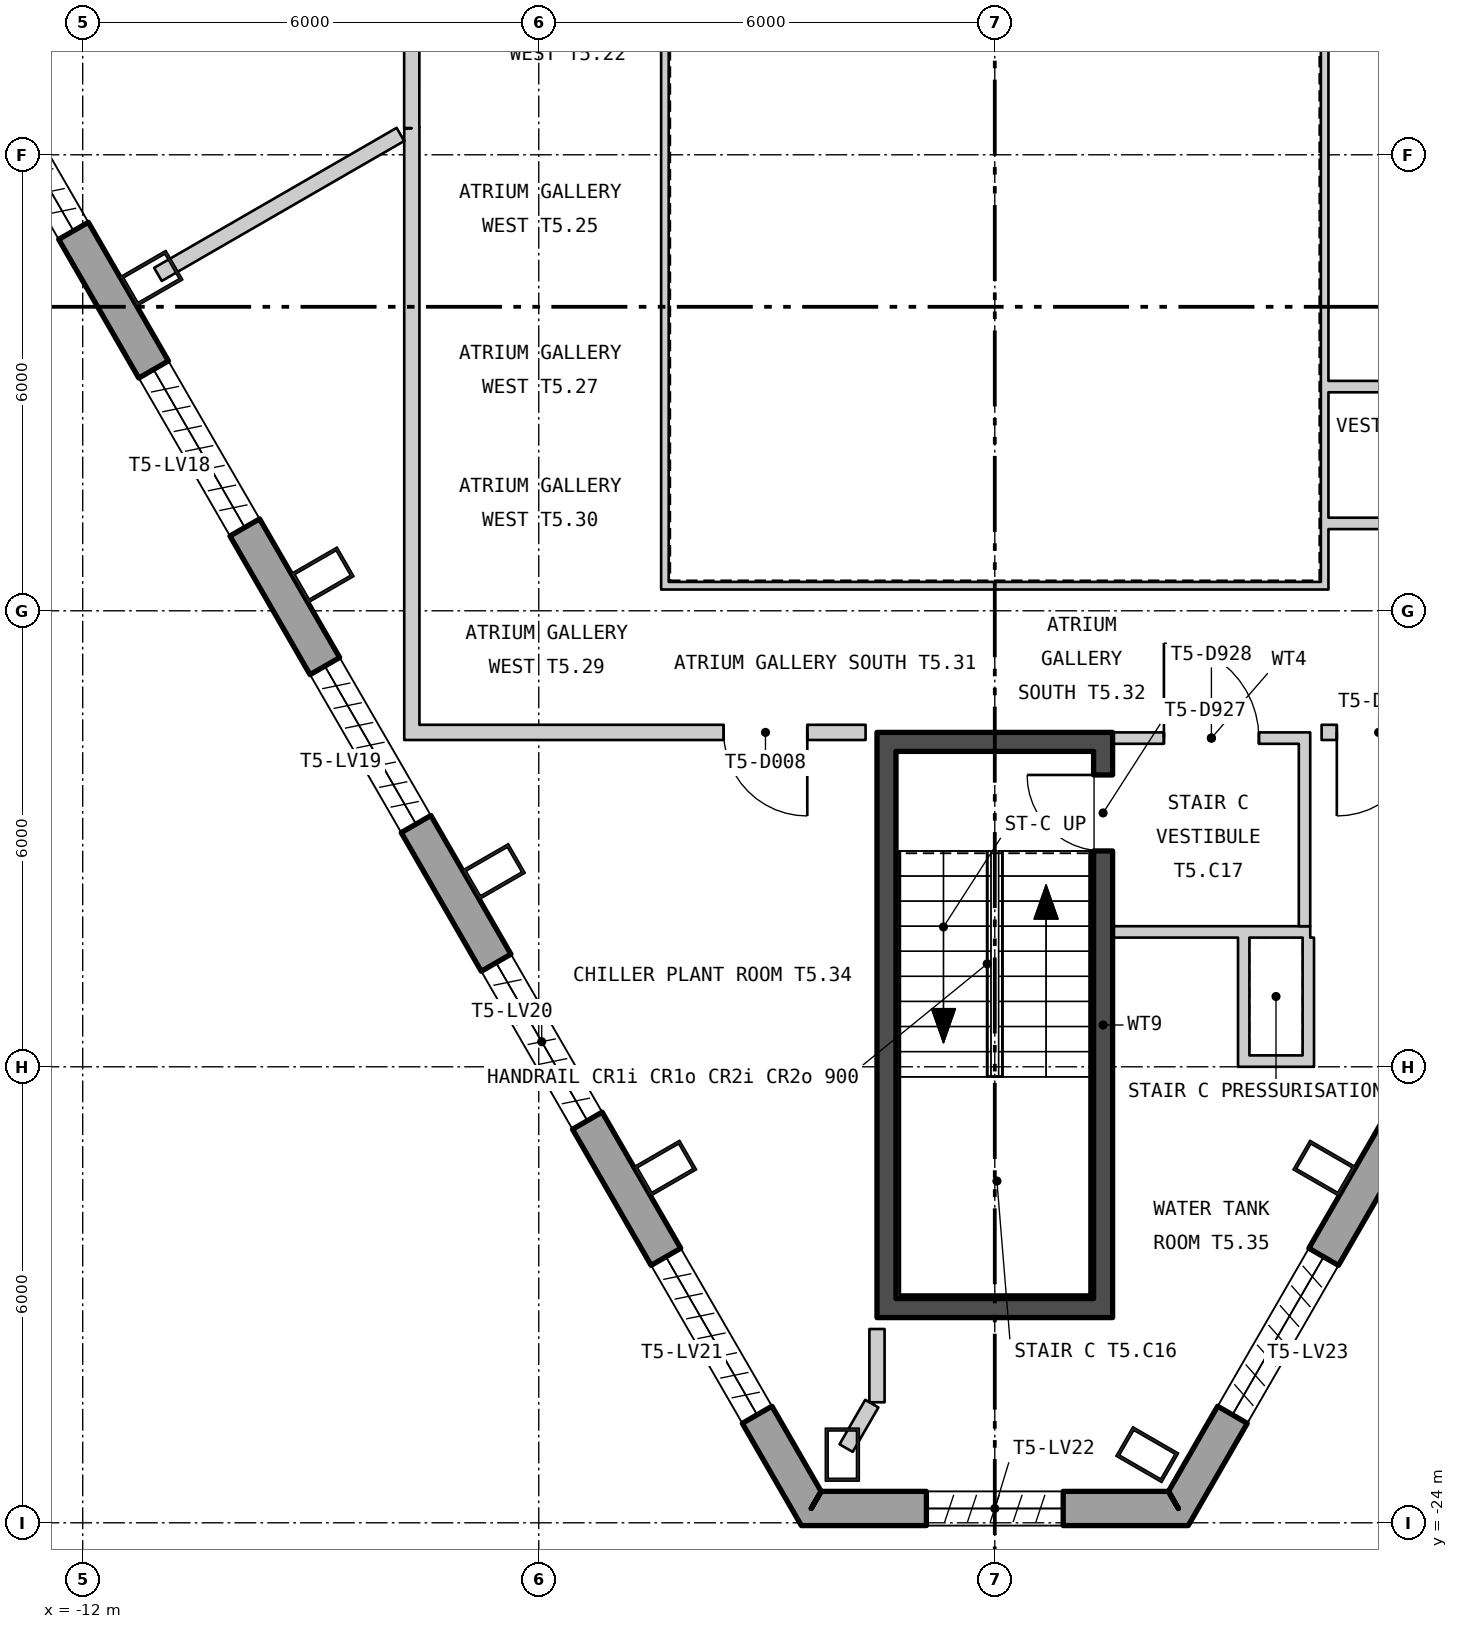
"""IFC4 building model, lengths in metres.
Left out: names, types, materials, properties, quantities, classifications, styles, units other than length and angle.
Written with IfcOpenShell. Run it as: python <this file> out.ifc"""

import sys

from ifc_helpers import new_model, si_unit, direction, frame, frame_2d, origin, origin_2d, place, context, subcontext, project, spatial, polyline, rectangle, hollow_rectangle, outline, extrude, element, fill, save


model = new_model("IFC4")
c1 = context("Model", 3, precision=1e-05, world=origin(), true_north=direction((0.0, 1.0)))
c2 = subcontext(c1, "Body", "Model", "MODEL_VIEW")
j1 = project(units=[si_unit("LENGTHUNIT", "METRE"), si_unit("PLANEANGLEUNIT", "RADIAN")], contexts=[c1])
p1 = place(None, origin())
s1 = spatial("IfcSite", under=j1, at=p1, CompositionType="ELEMENT")
p2 = place(p1, origin())
s2 = spatial("IfcBuilding", under=s1, at=p2, CompositionType="ELEMENT")
p3 = place(p2, frame((0.0, 0.0, 292.2)))
s3 = spatial("IfcBuildingStorey", under=s2, at=p3, CompositionType="ELEMENT", Elevation=292.2)
for number, where, z_axis, x_axis in (
    (1, (-11.096, -7.625, 0.0), (0.0, 0.0, 1.0), (0.5, -0.866, 0.0)),
    (2, (-8.843, -11.528, 0.0), (0.0, 0.0, 1.0), (0.5, -0.866, 0.0)),
    (3, (-6.59, -15.431, 0.0), (0.0, 0.0, 1.0), (0.5, -0.866, 0.0)),
    (4, (-4.336, -19.334, 0.0), (0.0, 0.0, 1.0), (0.5, -0.866, 0.0)),
    (5, (-2.006, -23.103, 0.0), (0.0, 0.0, 1.0), (1.0, 0.0, 0.0)),
    (6, (2.006, -23.103, 0.0), (0.0, 0.0, 1.0), (0.5, 0.866, 0.0)),
    (7, (4.336, -19.334, 0.0), (0.0, 0.0, 1.0), (0.5, 0.866, 0.0)),
):
    element("IfcColumn", number, at=place(p3, frame(where, z_axis=z_axis, x_axis=x_axis)), inside=s3, PredefinedType="COLUMN", context=c2, shape_type="SweptSolid", body=[
        extrude(hollow_rectangle(XDim=0.45, YDim=0.7, WallThickness=0.04, at=origin_2d()), origin(), (0.0, 0.0, 1.0), 6.0),
    ])
p4 = place(p3, frame((-25.28, 15.792, -0.18), z_axis=(0.0, 0.0, 1.0), x_axis=(0.500000141277, -0.866025322218, 0.0)))
e8 = element("IfcWall", 8, at=p4, inside=s3, PredefinedType="SOLIDWALL", context=c2, shape_type="SweptSolid", body=[
    extrude(outline(polyline([(-0.13, -0.225), (45.86, -0.225), (45.6, 0.225), (0.13, 0.225), (-0.13, -0.225)])), origin(), (0.0, 0.0, 1.0), 5.9),
])
p5 = place(p4, frame((1.424, 0.0, 1.38)))
e9 = element("IfcOpeningElement", 9, at=p5, cuts=e8, PredefinedType="OPENING", context=c2, shape_type="SweptSolid", body=[
    extrude(rectangle(XDim=2.4, YDim=3.6, at=frame_2d((1.2, 1.8))), frame((0.0, 0.235, 0.0), z_axis=(0.0, -1.0, 0.0), x_axis=(1.0, 0.0, 0.0)), (0.0, 0.0, 1.0), 0.47),
])
p6 = place(p4, frame((5.892, 0.0, 1.38)))
e10 = element("IfcOpeningElement", 10, at=p6, cuts=e8, PredefinedType="OPENING", context=c2, shape_type="SweptSolid", body=[
    extrude(rectangle(XDim=2.4, YDim=3.6, at=frame_2d((1.2, 1.8))), frame((0.0, 0.235, 0.0), z_axis=(0.0, -1.0, 0.0), x_axis=(1.0, 0.0, 0.0)), (0.0, 0.0, 1.0), 0.47),
])
p7 = place(p4, frame((10.399, 0.0, 1.38)))
e11 = element("IfcOpeningElement", 11, at=p7, cuts=e8, PredefinedType="OPENING", context=c2, shape_type="SweptSolid", body=[
    extrude(rectangle(XDim=2.4, YDim=3.6, at=frame_2d((1.2, 1.8))), frame((0.0, 0.235, 0.0), z_axis=(0.0, -1.0, 0.0), x_axis=(1.0, 0.0, 0.0)), (0.0, 0.0, 1.0), 0.47),
])
p8 = place(p4, frame((14.905, 0.0, 1.38)))
e12 = element("IfcOpeningElement", 12, at=p8, cuts=e8, PredefinedType="OPENING", context=c2, shape_type="SweptSolid", body=[
    extrude(rectangle(XDim=2.4, YDim=3.6, at=frame_2d((1.2, 1.8))), frame((0.0, 0.235, 0.0), z_axis=(0.0, -1.0, 0.0), x_axis=(1.0, 0.0, 0.0)), (0.0, 0.0, 1.0), 0.47),
])
p9 = place(p4, frame((19.412, 0.0, 1.38)))
e13 = element("IfcOpeningElement", 13, at=p9, cuts=e8, PredefinedType="OPENING", context=c2, shape_type="SweptSolid", body=[
    extrude(rectangle(XDim=2.4, YDim=3.6, at=frame_2d((1.2, 1.8))), frame((0.0, 0.235, 0.0), z_axis=(0.0, -1.0, 0.0), x_axis=(1.0, 0.0, 0.0)), (0.0, 0.0, 1.0), 0.47),
])
p10 = place(p4, frame((23.918, 0.0, 1.38)))
e14 = element("IfcOpeningElement", 14, at=p10, cuts=e8, PredefinedType="OPENING", context=c2, shape_type="SweptSolid", body=[
    extrude(rectangle(XDim=2.4, YDim=3.6, at=frame_2d((1.2, 1.8))), frame((0.0, 0.235, 0.0), z_axis=(0.0, -1.0, 0.0), x_axis=(1.0, 0.0, 0.0)), (0.0, 0.0, 1.0), 0.47),
])
p11 = place(p4, frame((28.425, 0.0, 1.38)))
e15 = element("IfcOpeningElement", 15, at=p11, cuts=e8, PredefinedType="OPENING", context=c2, shape_type="SweptSolid", body=[
    extrude(rectangle(XDim=2.4, YDim=3.6, at=frame_2d((1.2, 1.8))), frame((0.0, 0.235, 0.0), z_axis=(0.0, -1.0, 0.0), x_axis=(1.0, 0.0, 0.0)), (0.0, 0.0, 1.0), 0.47),
])
p12 = place(p4, frame((32.932, 0.0, 1.38)))
e16 = element("IfcOpeningElement", 16, at=p12, cuts=e8, PredefinedType="OPENING", context=c2, shape_type="SweptSolid", body=[
    extrude(rectangle(XDim=2.4, YDim=3.6, at=frame_2d((1.2, 1.8))), frame((0.0, 0.235, 0.0), z_axis=(0.0, -1.0, 0.0), x_axis=(1.0, 0.0, 0.0)), (0.0, 0.0, 1.0), 0.47),
])
p13 = place(p4, frame((37.438, 0.0, 1.38)))
e17 = element("IfcOpeningElement", 17, at=p13, cuts=e8, PredefinedType="OPENING", context=c2, shape_type="SweptSolid", body=[
    extrude(rectangle(XDim=2.4, YDim=3.6, at=frame_2d((1.2, 1.8))), frame((0.0, 0.235, 0.0), z_axis=(0.0, -1.0, 0.0), x_axis=(1.0, 0.0, 0.0)), (0.0, 0.0, 1.0), 0.47),
])
p14 = place(p4, frame((41.907, 0.0, 1.38)))
e18 = element("IfcOpeningElement", 18, at=p14, cuts=e8, PredefinedType="OPENING", context=c2, shape_type="SweptSolid", body=[
    extrude(rectangle(XDim=2.4, YDim=3.6, at=frame_2d((1.2, 1.8))), frame((0.0, 0.235, 0.0), z_axis=(0.0, -1.0, 0.0), x_axis=(1.0, 0.0, 0.0)), (0.0, 0.0, 1.0), 0.47),
])
p15 = place(p3, frame((-2.415, -23.812, -0.18), z_axis=(0.0, 0.0, 1.0), x_axis=(1.0, 0.0, 0.0)))
e19 = element("IfcWall", 19, at=p15, inside=s3, PredefinedType="SOLIDWALL", context=c2, shape_type="SweptSolid", body=[
    extrude(outline(polyline([(-0.13, -0.225), (4.96, -0.225), (4.7, 0.225), (0.13, 0.225), (-0.13, -0.225)])), origin(), (0.0, 0.0, 1.0), 5.9),
])
p16 = place(p15, frame((1.515, 0.0, 1.38)))
e20 = element("IfcOpeningElement", 20, at=p16, cuts=e19, PredefinedType="OPENING", context=c2, shape_type="SweptSolid", body=[
    extrude(rectangle(XDim=1.8, YDim=3.6, at=frame_2d((0.9, 1.8))), frame((0.0, 0.235, 0.0), z_axis=(0.0, -1.0, 0.0), x_axis=(1.0, 0.0, 0.0)), (0.0, 0.0, 1.0), 0.47),
])
p17 = place(p3, frame((2.415, -23.812, -0.18), z_axis=(0.0, 0.0, 1.0), x_axis=(0.499998326906, 0.866026369744, 0.0)))
e21 = element("IfcWall", 21, at=p17, inside=s3, PredefinedType="SOLIDWALL", context=c2, shape_type="SweptSolid", body=[
    extrude(outline(polyline([(-0.13, -0.225), (17.959, -0.225), (17.959, 0.225), (0.13, 0.225), (-0.13, -0.225)])), origin(), (0.0, 0.0, 1.0), 5.9),
])
p18 = place(p17, frame((1.424, 0.0, 1.38)))
e22 = element("IfcOpeningElement", 22, at=p18, cuts=e21, PredefinedType="OPENING", context=c2, shape_type="SweptSolid", body=[
    extrude(rectangle(XDim=2.4, YDim=3.6, at=frame_2d((1.2, 1.8))), frame((0.0, 0.235, 0.0), z_axis=(0.0, -1.0, 0.0), x_axis=(1.0, 0.0, 0.0)), (0.0, 0.0, 1.0), 0.47),
])
p19 = place(p17, frame((5.892, 0.0, 1.38)))
e23 = element("IfcOpeningElement", 23, at=p19, cuts=e21, PredefinedType="OPENING", context=c2, shape_type="SweptSolid", body=[
    extrude(rectangle(XDim=2.4, YDim=3.6, at=frame_2d((1.2, 1.8))), frame((0.0, 0.235, 0.0), z_axis=(0.0, -1.0, 0.0), x_axis=(1.0, 0.0, 0.0)), (0.0, 0.0, 1.0), 0.47),
])
p20 = place(p17, frame((10.399, 0.0, 1.38)))
e24 = element("IfcOpeningElement", 24, at=p20, cuts=e21, PredefinedType="OPENING", context=c2, shape_type="SweptSolid", body=[
    extrude(rectangle(XDim=2.4, YDim=3.6, at=frame_2d((1.2, 1.8))), frame((0.0, 0.235, 0.0), z_axis=(0.0, -1.0, 0.0), x_axis=(1.0, 0.0, 0.0)), (0.0, 0.0, 1.0), 0.47),
])
p21 = place(p17, frame((14.905, 0.0, 1.38)))
e25 = element("IfcOpeningElement", 25, at=p21, cuts=e21, PredefinedType="OPENING", context=c2, shape_type="SweptSolid", body=[
    extrude(rectangle(XDim=2.4, YDim=3.6, at=frame_2d((1.2, 1.8))), frame((0.0, 0.235, 0.0), z_axis=(0.0, -1.0, 0.0), x_axis=(1.0, 0.0, 0.0)), (0.0, 0.0, 1.0), 0.47),
])
p22 = place(p3, frame((-4.39, -11.67, 0.0), z_axis=(0.0, 0.0, 1.0), x_axis=(1.0, 0.0, 0.0)))
e26 = element("IfcWall", 26, at=p22, inside=s3, PredefinedType="PARTITIONING", context=c2, shape_type="SweptSolid", body=[
    extrude(rectangle(XDim=8.78, YDim=0.1, at=frame_2d((4.39, 0.0))), origin(), (0.0, 0.0, 1.0), 5.7),
])
for number, where, z_axis, x_axis in (
    (27, (4.34, -11.62, 0.0), (0.0, 0.0, 1.0), (0.0, 1.0, 0.0)),
    (28, (-4.34, -3.58, 0.0), (0.0, 0.0, 1.0), (0.0, -1.0, 0.0)),
):
    element("IfcWall", number, at=place(p3, frame(where, z_axis=z_axis, x_axis=x_axis)), inside=s3, PredefinedType="PARTITIONING", context=c2, shape_type="SweptSolid", body=[
        extrude(rectangle(XDim=8.04, YDim=0.1, at=frame_2d((4.02, 0.0))), origin(), (0.0, 0.0, 1.0), 5.7),
    ])
p23 = place(p3, frame((-1.425, -21.05, 0.0), z_axis=(0.0, 0.0, 1.0), x_axis=(0.0, 1.0, 0.0)))
e29 = element("IfcWall", 29, at=p23, inside=s3, PredefinedType="SHEAR", context=c2, shape_type="SweptSolid", body=[
    extrude(rectangle(XDim=7.2, YDim=0.25, at=frame_2d((3.6, 0.0))), origin(), (0.0, 0.0, 1.0), 5.7),
])
p24 = place(p3, frame((1.425, -21.05, 0.0), z_axis=(0.0, 0.0, 1.0), x_axis=(0.0, 1.0, 0.0)))
e30 = element("IfcWall", 30, at=p24, inside=s3, PredefinedType="SHEAR", context=c2, shape_type="SweptSolid", body=[
    extrude(rectangle(XDim=7.2, YDim=0.25, at=frame_2d((3.6, 0.0))), origin(), (0.0, 0.0, 1.0), 5.7),
])
p25 = place(p24, frame((5.89, 0.0, 0.0)))
e31 = element("IfcOpeningElement", 31, at=p25, cuts=e30, PredefinedType="OPENING", context=c2, shape_type="SweptSolid", body=[
    extrude(rectangle(XDim=1.0, YDim=2.1, at=frame_2d((0.5, 1.05))), frame((0.0, 0.135, 0.0), z_axis=(0.0, -1.0, 0.0), x_axis=(1.0, 0.0, 0.0)), (0.0, 0.0, 1.0), 0.27),
])
for number, where, z_axis, x_axis in (
    (32, (-1.55, -21.175, 0.0), (0.0, 0.0, 1.0), (1.0, 0.0, 0.0)),
    (33, (-1.55, -13.725, 0.0), (0.0, 0.0, 1.0), (1.0, 0.0, 0.0)),
):
    element("IfcWall", number, at=place(p3, frame(where, z_axis=z_axis, x_axis=x_axis)), inside=s3, PredefinedType="SHEAR", context=c2, shape_type="SweptSolid", body=[
        extrude(rectangle(XDim=3.1, YDim=0.25, at=frame_2d((1.55, 0.0))), origin(), (0.0, 0.0, 1.0), 5.7),
    ])
p26 = place(p3, frame((1.55, -16.225, 0.0), z_axis=(0.0, 0.0, 1.0), x_axis=(1.0, 0.0, 0.0)))
e34 = element("IfcWall", 34, at=p26, inside=s3, PredefinedType="PARTITIONING", context=c2, shape_type="SweptSolid", body=[
    extrude(rectangle(XDim=2.6, YDim=0.15, at=frame_2d((1.3, 0.0))), origin(), (0.0, 0.0, 1.0), 5.7),
])
p27 = place(p3, frame((4.075, -16.15, 0.0), z_axis=(0.0, 0.0, 1.0), x_axis=(0.0, 1.0, 0.0)))
e35 = element("IfcWall", 35, at=p27, inside=s3, PredefinedType="PARTITIONING", context=c2, shape_type="SweptSolid", body=[
    extrude(rectangle(XDim=2.4, YDim=0.15, at=frame_2d((1.2, 0.0))), origin(), (0.0, 0.0, 1.0), 5.7),
])
p28 = place(p3, frame((1.55, -13.675, 0.0), z_axis=(0.0, 0.0, 1.0), x_axis=(1.0, 0.0, 0.0)))
e36 = element("IfcWall", 36, at=p28, inside=s3, PredefinedType="PARTITIONING", context=c2, shape_type="SweptSolid", body=[
    extrude(rectangle(XDim=2.6, YDim=0.15, at=frame_2d((1.3, 0.0))), origin(), (0.0, 0.0, 1.0), 4.79),
])
p29 = place(p28, frame((0.675, 0.0, 0.0)))
e37 = element("IfcOpeningElement", 37, at=p29, cuts=e36, PredefinedType="OPENING", context=c2, shape_type="SweptSolid", body=[
    extrude(rectangle(XDim=1.25, YDim=2.1, at=frame_2d((0.625, 1.05))), frame((0.0, 0.085, 0.0), z_axis=(0.0, -1.0, 0.0), x_axis=(1.0, 0.0, 0.0)), (0.0, 0.0, 1.0), 0.17),
])
p30 = place(p3, frame((3.275, -18.0, 0.0), z_axis=(0.0, 0.0, 1.0), x_axis=(0.0, 1.0, 0.0)))
e38 = element("IfcWall", 38, at=p30, inside=s3, PredefinedType="PARTITIONING", context=c2, shape_type="SweptSolid", body=[
    extrude(rectangle(XDim=1.7, YDim=0.15, at=frame_2d((0.85, 0.0))), origin(), (0.0, 0.0, 1.0), 5.25),
])
p31 = place(p3, frame((3.35, -17.925, 0.0), z_axis=(0.0, 0.0, 1.0), x_axis=(1.0, 0.0, 0.0)))
e39 = element("IfcWall", 39, at=p31, inside=s3, PredefinedType="PARTITIONING", context=c2, shape_type="SweptSolid", body=[
    extrude(rectangle(XDim=0.7, YDim=0.15, at=frame_2d((0.35, 0.0))), origin(), (0.0, 0.0, 1.0), 5.7),
])
p32 = place(p3, frame((4.125, -18.0, 0.0), z_axis=(0.0, 0.0, 1.0), x_axis=(0.0, 1.0, 0.0)))
e40 = element("IfcWall", 40, at=p32, inside=s3, PredefinedType="PARTITIONING", context=c2, shape_type="SweptSolid", body=[
    extrude(rectangle(XDim=1.7, YDim=0.15, at=frame_2d((0.85, 0.0))), origin(), (0.0, 0.0, 1.0), 5.7),
])
p33 = place(p3, frame((-11.01, -7.574, 0.0), z_axis=(0.0, 0.0, 1.0), x_axis=(0.865995704065, 0.500051437896, 0.0)))
e41 = element("IfcWall", 41, at=p33, inside=s3, PredefinedType="PARTITIONING", context=c2, shape_type="SweptSolid", body=[
    extrude(rectangle(XDim=3.684, YDim=0.2, at=frame_2d((1.842, 0.0))), origin(), (0.0, 0.0, 1.0), 5.7),
])
p34 = place(p3, frame((-7.671, -5.65, 0.0), z_axis=(0.0, 0.0, 1.0), x_axis=(0.000129032257, 0.999999991675, 0.0)))
e42 = element("IfcWall", 42, at=p34, inside=s3, PredefinedType="PARTITIONING", context=c2, shape_type="SweptSolid", body=[
    extrude(rectangle(XDim=7.75, YDim=0.2, at=frame_2d((3.875, 0.0))), origin(), (0.0, 0.0, 1.0), 5.7),
])
p35 = place(p3, frame((-7.67, -13.7, 0.0), z_axis=(0.0, 0.0, 1.0), x_axis=(0.0, 1.0, 0.0)))
e43 = element("IfcWall", 43, at=p35, inside=s3, PredefinedType="PARTITIONING", context=c2, shape_type="SweptSolid", body=[
    extrude(rectangle(XDim=8.05, YDim=0.2, at=frame_2d((4.025, 0.0))), origin(), (0.0, 0.0, 1.0), 5.7),
])
p36 = place(p3, frame((-7.57, -13.6, 0.0), z_axis=(0.0, 0.0, 1.0), x_axis=(1.0, 0.0, 0.0)))
e44 = element("IfcWall", 44, at=p36, inside=s3, PredefinedType="PARTITIONING", context=c2, shape_type="SweptSolid", body=[
    extrude(rectangle(XDim=5.87, YDim=0.2, at=frame_2d((2.935, 0.0))), origin(), (0.0, 0.0, 1.0), 4.79),
])
p37 = place(p36, frame((4.003, 0.0, 0.0)))
e45 = element("IfcOpeningElement", 45, at=p37, cuts=e44, PredefinedType="OPENING", context=c2, shape_type="SweptSolid", body=[
    extrude(rectangle(XDim=1.1, YDim=2.1, at=frame_2d((0.55, 1.05))), frame((0.0, 0.11, 0.0), z_axis=(0.0, -1.0, 0.0), x_axis=(1.0, 0.0, 0.0)), (0.0, 0.0, 1.0), 0.22),
])
p38 = place(p3, frame((-1.956, -23.017, 0.0), z_axis=(0.0, 0.0, 1.0), x_axis=(0.500277597875, 0.865865073245, 0.0)))
e46 = element("IfcWall", 46, at=p38, inside=s3, PredefinedType="PARTITIONING", context=c2, shape_type="SweptSolid", body=[
    extrude(rectangle(XDim=0.676, YDim=0.2, at=frame_2d((0.338, 0.0))), origin(), (0.0, 0.0, 1.0), 5.7),
])
p39 = place(p3, frame((-1.55, -22.414, 0.0), z_axis=(0.0, 0.0, 1.0), x_axis=(0.0, 1.0, 0.0)))
e47 = element("IfcWall", 47, at=p39, inside=s3, PredefinedType="PARTITIONING", context=c2, shape_type="SweptSolid", body=[
    extrude(rectangle(XDim=0.964, YDim=0.2, at=frame_2d((0.482, 0.0))), origin(), (0.0, 0.0, 1.0), 5.7),
])
p40 = place(p3, frame((4.3, -13.6, 0.0), z_axis=(0.0, 0.0, 1.0), x_axis=(1.0, 0.0, 0.0)))
e48 = element("IfcWall", 48, at=p40, inside=s3, PredefinedType="PARTITIONING", context=c2, shape_type="SweptSolid", body=[
    extrude(rectangle(XDim=3.27, YDim=0.2, at=frame_2d((1.635, 0.0))), origin(), (0.0, 0.0, 1.0), 4.79),
])
p41 = place(p40, frame((0.2, 0.0, 0.0)))
e49 = element("IfcOpeningElement", 49, at=p41, cuts=e48, PredefinedType="OPENING", context=c2, shape_type="SweptSolid", body=[
    extrude(rectangle(XDim=1.1, YDim=2.1, at=frame_2d((0.55, 1.05))), frame((0.0, 0.11, 0.0), z_axis=(0.0, -1.0, 0.0), x_axis=(1.0, 0.0, 0.0)), (0.0, 0.0, 1.0), 0.22),
])
p42 = place(p3, frame((4.39, -10.85, 0.0), z_axis=(0.0, 0.0, 1.0), x_axis=(1.0, 0.0, 0.0)))
e50 = element("IfcWall", 50, at=p42, inside=s3, PredefinedType="PARTITIONING", context=c2, shape_type="SweptSolid", body=[
    extrude(rectangle(XDim=3.18, YDim=0.15, at=frame_2d((1.59, 0.0))), origin(), (0.0, 0.0, 1.0), 5.7),
])
p43 = place(p42, frame((1.09, 0.0, 0.0)))
e51 = element("IfcOpeningElement", 51, at=p43, cuts=e50, PredefinedType="OPENING", context=c2, shape_type="SweptSolid", body=[
    extrude(rectangle(XDim=1.0, YDim=2.1, at=frame_2d((0.5, 1.05))), frame((0.0, 0.085, 0.0), z_axis=(0.0, -1.0, 0.0), x_axis=(1.0, 0.0, 0.0)), (0.0, 0.0, 1.0), 0.17),
])
p44 = place(p3, frame((4.39, -9.05, 0.0), z_axis=(0.0, 0.0, 1.0), x_axis=(1.0, 0.0, 0.0)))
e52 = element("IfcWall", 52, at=p44, inside=s3, PredefinedType="PARTITIONING", context=c2, shape_type="SweptSolid", body=[
    extrude(rectangle(XDim=3.18, YDim=0.15, at=frame_2d((1.59, 0.0))), origin(), (0.0, 0.0, 1.0), 5.7),
])
p45 = place(p44, frame((1.09, 0.0, 0.0)))
e53 = element("IfcOpeningElement", 53, at=p45, cuts=e52, PredefinedType="OPENING", context=c2, shape_type="SweptSolid", body=[
    extrude(rectangle(XDim=1.0, YDim=2.1, at=frame_2d((0.5, 1.05))), frame((0.0, 0.085, 0.0), z_axis=(0.0, -1.0, 0.0), x_axis=(1.0, 0.0, 0.0)), (0.0, 0.0, 1.0), 0.17),
])
p46 = place(p25, origin())
e54 = element("IfcDoor", 54, at=p46, inside=s3, OperationType="SINGLE_SWING_LEFT", PredefinedType="DOOR", context=c2, shape_type="SweptSolid", body=[
    extrude(rectangle(XDim=1.0, YDim=2.1, at=frame_2d((0.5, 1.05))), frame((0.0, 0.025, 0.0), z_axis=(0.0, -1.0, 0.0), x_axis=(1.0, 0.0, 0.0)), (0.0, 0.0, 1.0), 0.05),
])
fill(e31, e54)
p47 = place(p29, origin())
e55 = element("IfcDoor", 55, at=p47, inside=s3, OperationType="SINGLE_SWING_RIGHT", PredefinedType="DOOR", context=c2, shape_type="SweptSolid", body=[
    extrude(rectangle(XDim=1.25, YDim=2.1, at=frame_2d((0.625, 1.05))), frame((0.0, 0.025, 0.0), z_axis=(0.0, -1.0, 0.0), x_axis=(1.0, 0.0, 0.0)), (0.0, 0.0, 1.0), 0.05),
])
fill(e37, e55)
p48 = place(p37, origin())
e56 = element("IfcDoor", 56, at=p48, inside=s3, OperationType="SINGLE_SWING_RIGHT", PredefinedType="DOOR", context=c2, shape_type="SweptSolid", body=[
    extrude(rectangle(XDim=1.1, YDim=2.1, at=frame_2d((0.55, 1.05))), frame((0.0, 0.025, 0.0), z_axis=(0.0, -1.0, 0.0), x_axis=(1.0, 0.0, 0.0)), (0.0, 0.0, 1.0), 0.05),
])
fill(e45, e56)
p49 = place(p41, origin())
e57 = element("IfcDoor", 57, at=p49, inside=s3, OperationType="SINGLE_SWING_LEFT", PredefinedType="DOOR", context=c2, shape_type="SweptSolid", body=[
    extrude(rectangle(XDim=1.1, YDim=2.1, at=frame_2d((0.55, 1.05))), frame((0.0, 0.025, 0.0), z_axis=(0.0, -1.0, 0.0), x_axis=(1.0, 0.0, 0.0)), (0.0, 0.0, 1.0), 0.05),
])
fill(e49, e57)
save(model, sys.argv[1])
